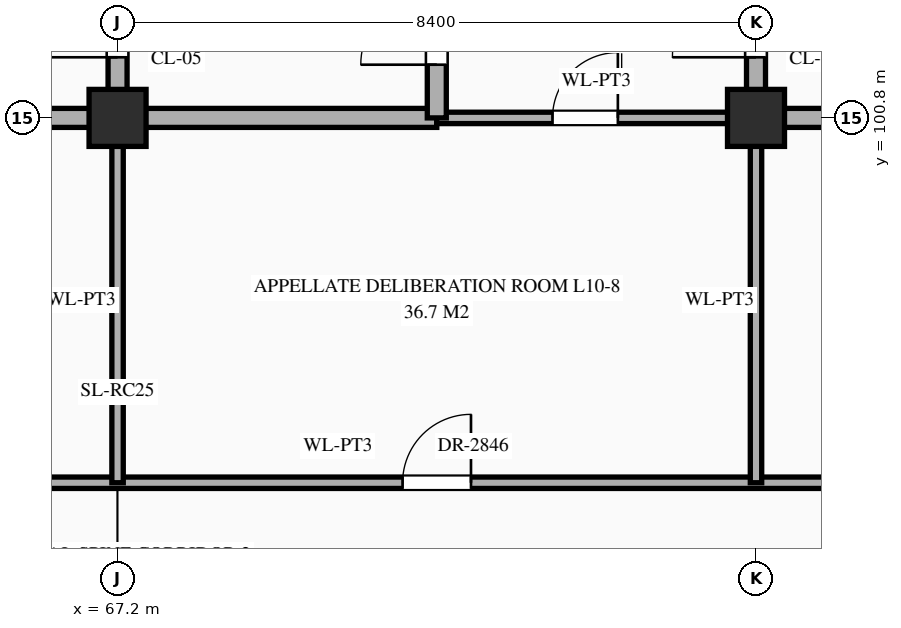
"""IFC4 building model, lengths in metres.
Left out: names, types, materials, properties, quantities, classifications, styles, units other than length and angle.
Written with IfcOpenShell. Run it as: python <this file> out.ifc"""

import sys

from ifc_helpers import new_model, si_unit, direction, frame, frame_2d, origin, origin_2d, place, context, subcontext, project, spatial, rectangle, extrude, element, fill, save


model = new_model("IFC4")
c1 = context("Model", 3, precision=1e-05, world=origin(), true_north=direction((0.0, 1.0)))
c2 = subcontext(c1, "Body", "Model", "MODEL_VIEW")
j1 = project(units=[si_unit("LENGTHUNIT", "METRE"), si_unit("PLANEANGLEUNIT", "RADIAN")], contexts=[c1])
p1 = place(None, origin())
s1 = spatial("IfcSite", under=j1, at=p1, CompositionType="ELEMENT")
p2 = place(p1, origin())
s2 = spatial("IfcBuilding", under=s1, at=p2, CompositionType="ELEMENT")
p3 = place(p2, frame((0.0, 0.0, 43.5)))
s3 = spatial("IfcBuildingStorey", under=s2, at=p3, CompositionType="ELEMENT", Elevation=43.5)
for number, where, z_axis, x_axis in (
    (1, (67.2, 100.8, 0.0), (0.0, 0.0, 1.0), (1.0, 0.0, 0.0)),
    (2, (75.6, 100.8, 0.0), (0.0, 0.0, 1.0), (1.0, 0.0, 0.0)),
):
    element("IfcColumn", number, at=place(p3, frame(where, z_axis=z_axis, x_axis=x_axis)), inside=s3, PredefinedType="COLUMN", context=c2, shape_type="SweptSolid", body=[
        extrude(rectangle(XDim=0.75, YDim=0.75, at=origin_2d()), origin(), (0.0, 0.0, 1.0), 4.2),
    ])
p4 = place(p3, frame((56.2, 96.0, 0.0), z_axis=(0.0, 0.0, 1.0), x_axis=(1.0, 0.0, 0.0)))
e3 = element("IfcWall", 3, at=p4, inside=s3, PredefinedType="STANDARD", context=c2, shape_type="SweptSolid", body=[
    extrude(rectangle(XDim=27.8, YDim=0.15, at=frame_2d((13.9, 0.0))), origin(), (0.0, 0.0, 1.0), 3.95),
])
p5 = place(p4, frame((0.77, 0.0, 0.0)))
e4 = element("IfcOpeningElement", 4, at=p5, cuts=e3, PredefinedType="OPENING", context=c2, shape_type="SweptSolid", body=[
    extrude(rectangle(XDim=1.06, YDim=2.4, at=frame_2d((0.53, 1.2))), frame((0.0, 0.087, 0.0), z_axis=(0.0, -1.0, 0.0), x_axis=(1.0, 0.0, 0.0)), (0.0, 0.0, 1.0), 0.174),
])
p6 = place(p4, frame((6.23, 0.0, 0.0)))
e5 = element("IfcOpeningElement", 5, at=p6, cuts=e3, PredefinedType="OPENING", context=c2, shape_type="SweptSolid", body=[
    extrude(rectangle(XDim=1.14, YDim=2.4, at=frame_2d((0.57, 1.2))), frame((0.0, 0.087, 0.0), z_axis=(0.0, -1.0, 0.0), x_axis=(1.0, 0.0, 0.0)), (0.0, 0.0, 1.0), 0.174),
])
p7 = place(p4, frame((14.75, 0.0, 0.0)))
e6 = element("IfcOpeningElement", 6, at=p7, cuts=e3, PredefinedType="OPENING", context=c2, shape_type="SweptSolid", body=[
    extrude(rectangle(XDim=0.9, YDim=2.15, at=frame_2d((0.45, 1.075))), frame((0.0, 0.087, 0.0), z_axis=(0.0, -1.0, 0.0), x_axis=(1.0, 0.0, 0.0)), (0.0, 0.0, 1.0), 0.174),
])
p8 = place(p4, frame((23.17, 0.0, 0.0)))
e7 = element("IfcOpeningElement", 7, at=p8, cuts=e3, PredefinedType="OPENING", context=c2, shape_type="SweptSolid", body=[
    extrude(rectangle(XDim=0.86, YDim=2.1, at=frame_2d((0.43, 1.05))), frame((0.0, 0.087, 0.0), z_axis=(0.0, -1.0, 0.0), x_axis=(1.0, 0.0, 0.0)), (0.0, 0.0, 1.0), 0.174),
])
p9 = place(p3, frame((58.8, 100.8, 0.0), z_axis=(0.0, 0.0, 1.0), x_axis=(1.0, 0.0, 0.0)))
e8 = element("IfcWall", 8, at=p9, inside=s3, PredefinedType="STANDARD", context=c2, shape_type="SweptSolid", body=[
    extrude(rectangle(XDim=12.6, YDim=0.25, at=frame_2d((6.3, 0.0))), origin(), (0.0, 0.0, 1.0), 3.1),
])
p10 = place(p9, frame((3.725, 0.0, 0.0)))
e9 = element("IfcOpeningElement", 9, at=p10, cuts=e8, PredefinedType="OPENING", context=c2, shape_type="SweptSolid", body=[
    extrude(rectangle(XDim=0.95, YDim=2.15, at=frame_2d((0.475, 1.075))), frame((0.0, 0.137, 0.0), z_axis=(0.0, -1.0, 0.0), x_axis=(1.0, 0.0, 0.0)), (0.0, 0.0, 1.0), 0.274),
])
p11 = place(p3, frame((71.4, 100.8, 0.0), z_axis=(0.0, 0.0, 1.0), x_axis=(1.0, 0.0, 0.0)))
e10 = element("IfcWall", 10, at=p11, inside=s3, PredefinedType="STANDARD", context=c2, shape_type="SweptSolid", body=[
    extrude(rectangle(XDim=4.2, YDim=0.15, at=frame_2d((2.1, 0.0))), origin(), (0.0, 0.0, 1.0), 3.1),
])
p12 = place(p11, frame((1.522, 0.0, 0.0)))
e11 = element("IfcOpeningElement", 11, at=p12, cuts=e10, PredefinedType="OPENING", context=c2, shape_type="SweptSolid", body=[
    extrude(rectangle(XDim=0.86, YDim=2.1, at=frame_2d((0.43, 1.05))), frame((0.0, 0.087, 0.0), z_axis=(0.0, -1.0, 0.0), x_axis=(1.0, 0.0, 0.0)), (0.0, 0.0, 1.0), 0.174),
])
p13 = place(p3, frame((75.6, 100.8, 0.0), z_axis=(0.0, 0.0, 1.0), x_axis=(1.0, 0.0, 0.0)))
e12 = element("IfcWall", 12, at=p13, inside=s3, PredefinedType="STANDARD", context=c2, shape_type="SweptSolid", body=[
    extrude(rectangle(XDim=16.8, YDim=0.25, at=frame_2d((8.4, 0.0))), origin(), (0.0, 0.0, 1.0), 3.1),
])
p14 = place(p13, frame((3.725, 0.0, 0.0)))
e13 = element("IfcOpeningElement", 13, at=p14, cuts=e12, PredefinedType="OPENING", context=c2, shape_type="SweptSolid", body=[
    extrude(rectangle(XDim=0.95, YDim=2.15, at=frame_2d((0.475, 1.075))), frame((0.0, 0.137, 0.0), z_axis=(0.0, -1.0, 0.0), x_axis=(1.0, 0.0, 0.0)), (0.0, 0.0, 1.0), 0.274),
])
p15 = place(p13, frame((9.748, 0.0, 0.0)))
e14 = element("IfcOpeningElement", 14, at=p15, cuts=e12, PredefinedType="OPENING", context=c2, shape_type="SweptSolid", body=[
    extrude(rectangle(XDim=1.0, YDim=2.2, at=frame_2d((0.5, 1.1))), frame((0.0, 0.137, 0.0), z_axis=(0.0, -1.0, 0.0), x_axis=(1.0, 0.0, 0.0)), (0.0, 0.0, 1.0), 0.274),
])
p16 = place(p13, frame((12.525, 0.0, 0.0)))
e15 = element("IfcOpeningElement", 15, at=p16, cuts=e12, PredefinedType="OPENING", context=c2, shape_type="SweptSolid", body=[
    extrude(rectangle(XDim=0.95, YDim=2.15, at=frame_2d((0.475, 1.075))), frame((0.0, 0.137, 0.0), z_axis=(0.0, -1.0, 0.0), x_axis=(1.0, 0.0, 0.0)), (0.0, 0.0, 1.0), 0.274),
])
p17 = place(p13, frame((14.802, 0.0, 0.0)))
e16 = element("IfcOpeningElement", 16, at=p17, cuts=e12, PredefinedType="OPENING", context=c2, shape_type="SweptSolid", body=[
    extrude(rectangle(XDim=1.1, YDim=2.2, at=frame_2d((0.55, 1.1))), frame((0.0, 0.137, 0.0), z_axis=(0.0, -1.0, 0.0), x_axis=(1.0, 0.0, 0.0)), (0.0, 0.0, 1.0), 0.274),
])
p18 = place(p3, frame((67.2, 96.0, 0.0), z_axis=(0.0, 0.0, 1.0), x_axis=(0.0, 1.0, 0.0)))
e17 = element("IfcWall", 17, at=p18, inside=s3, PredefinedType="STANDARD", context=c2, shape_type="SweptSolid", body=[
    extrude(rectangle(XDim=4.8, YDim=0.15, at=frame_2d((2.4, 0.0))), origin(), (0.0, 0.0, 1.0), 3.2),
])
p19 = place(p3, frame((67.2, 100.8, 0.0), z_axis=(0.0, 0.0, 1.0), x_axis=(0.0, 1.0, 0.0)))
e18 = element("IfcWall", 18, at=p19, inside=s3, PredefinedType="STANDARD", context=c2, shape_type="SweptSolid", body=[
    extrude(rectangle(XDim=2.4, YDim=0.25, at=frame_2d((1.2, 0.0))), origin(), (0.0, 0.0, 1.0), 3.2),
])
p20 = place(p19, frame((0.798, 0.0, 0.0)))
e19 = element("IfcOpeningElement", 19, at=p20, cuts=e18, PredefinedType="OPENING", context=c2, shape_type="SweptSolid", body=[
    extrude(rectangle(XDim=1.1, YDim=2.2, at=frame_2d((0.55, 1.1))), frame((0.0, 0.137, 0.0), z_axis=(0.0, -1.0, 0.0), x_axis=(1.0, 0.0, 0.0)), (0.0, 0.0, 1.0), 0.274),
])
p21 = place(p3, frame((71.4, 100.8, 0.0), z_axis=(0.0, 0.0, 1.0), x_axis=(0.0, 1.0, 0.0)))
e20 = element("IfcWall", 20, at=p21, inside=s3, PredefinedType="STANDARD", context=c2, shape_type="SweptSolid", body=[
    extrude(rectangle(XDim=3.6, YDim=0.25, at=frame_2d((1.8, 0.0))), origin(), (0.0, 0.0, 1.0), 3.6),
])
p22 = place(p21, frame((0.7, 0.0, 0.0)))
e21 = element("IfcOpeningElement", 21, at=p22, cuts=e20, PredefinedType="OPENING", context=c2, shape_type="SweptSolid", body=[
    extrude(rectangle(XDim=1.0, YDim=2.2, at=frame_2d((0.5, 1.1))), frame((0.0, 0.137, 0.0), z_axis=(0.0, -1.0, 0.0), x_axis=(1.0, 0.0, 0.0)), (0.0, 0.0, 1.0), 0.274),
])
p23 = place(p3, frame((75.6, 96.0, 0.0), z_axis=(0.0, 0.0, 1.0), x_axis=(0.0, 1.0, 0.0)))
e22 = element("IfcWall", 22, at=p23, inside=s3, PredefinedType="STANDARD", context=c2, shape_type="SweptSolid", body=[
    extrude(rectangle(XDim=4.8, YDim=0.15, at=frame_2d((2.4, 0.0))), origin(), (0.0, 0.0, 1.0), 3.2),
])
p24 = place(p3, frame((75.6, 100.8, 0.0), z_axis=(0.0, 0.0, 1.0), x_axis=(0.0, 1.0, 0.0)))
e23 = element("IfcWall", 23, at=p24, inside=s3, PredefinedType="STANDARD", context=c2, shape_type="SweptSolid", body=[
    extrude(rectangle(XDim=3.6, YDim=0.25, at=frame_2d((1.8, 0.0))), origin(), (0.0, 0.0, 1.0), 3.2),
])
p25 = place(p24, frame((0.798, 0.0, 0.0)))
e24 = element("IfcOpeningElement", 24, at=p25, cuts=e23, PredefinedType="OPENING", context=c2, shape_type="SweptSolid", body=[
    extrude(rectangle(XDim=1.1, YDim=2.2, at=frame_2d((0.55, 1.1))), frame((0.0, 0.137, 0.0), z_axis=(0.0, -1.0, 0.0), x_axis=(1.0, 0.0, 0.0)), (0.0, 0.0, 1.0), 0.274),
])
p26 = place(p20, origin())
e25 = element("IfcDoor", 25, at=p26, inside=s3, OperationType="SINGLE_SWING_LEFT", PredefinedType="DOOR", context=c2, shape_type="SweptSolid", body=[
    extrude(rectangle(XDim=1.1, YDim=2.2, at=frame_2d((0.55, 1.1))), frame((0.0, 0.025, 0.0), z_axis=(0.0, -1.0, 0.0), x_axis=(1.0, 0.0, 0.0)), (0.0, 0.0, 1.0), 0.05),
])
fill(e19, e25)
p27 = place(p22, origin())
e26 = element("IfcDoor", 26, at=p27, inside=s3, OperationType="SINGLE_SWING_LEFT", PredefinedType="DOOR", context=c2, shape_type="SweptSolid", body=[
    extrude(rectangle(XDim=1.0, YDim=2.2, at=frame_2d((0.5, 1.1))), frame((0.0, 0.025, 0.0), z_axis=(0.0, -1.0, 0.0), x_axis=(1.0, 0.0, 0.0)), (0.0, 0.0, 1.0), 0.05),
])
fill(e21, e26)
p28 = place(p25, origin())
e27 = element("IfcDoor", 27, at=p28, inside=s3, OperationType="SINGLE_SWING_LEFT", PredefinedType="DOOR", context=c2, shape_type="SweptSolid", body=[
    extrude(rectangle(XDim=1.1, YDim=2.2, at=frame_2d((0.55, 1.1))), frame((0.0, 0.025, 0.0), z_axis=(0.0, -1.0, 0.0), x_axis=(1.0, 0.0, 0.0)), (0.0, 0.0, 1.0), 0.05),
])
fill(e24, e27)
p29 = place(p12, origin())
e28 = element("IfcDoor", 28, at=p29, inside=s3, OperationType="SINGLE_SWING_RIGHT", PredefinedType="DOOR", context=c2, shape_type="SweptSolid", body=[
    extrude(rectangle(XDim=0.86, YDim=2.1, at=frame_2d((0.43, 1.05))), frame((0.0, 0.025, 0.0), z_axis=(0.0, -1.0, 0.0), x_axis=(1.0, 0.0, 0.0)), (0.0, 0.0, 1.0), 0.05),
])
fill(e11, e28)
p30 = place(p7, origin())
e29 = element("IfcDoor", 29, at=p30, inside=s3, OperationType="SINGLE_SWING_RIGHT", PredefinedType="DOOR", context=c2, shape_type="SweptSolid", body=[
    extrude(rectangle(XDim=0.9, YDim=2.15, at=frame_2d((0.45, 1.075))), frame((0.0, 0.025, 0.0), z_axis=(0.0, -1.0, 0.0), x_axis=(1.0, 0.0, 0.0)), (0.0, 0.0, 1.0), 0.05),
])
fill(e6, e29)
save(model, sys.argv[1])
